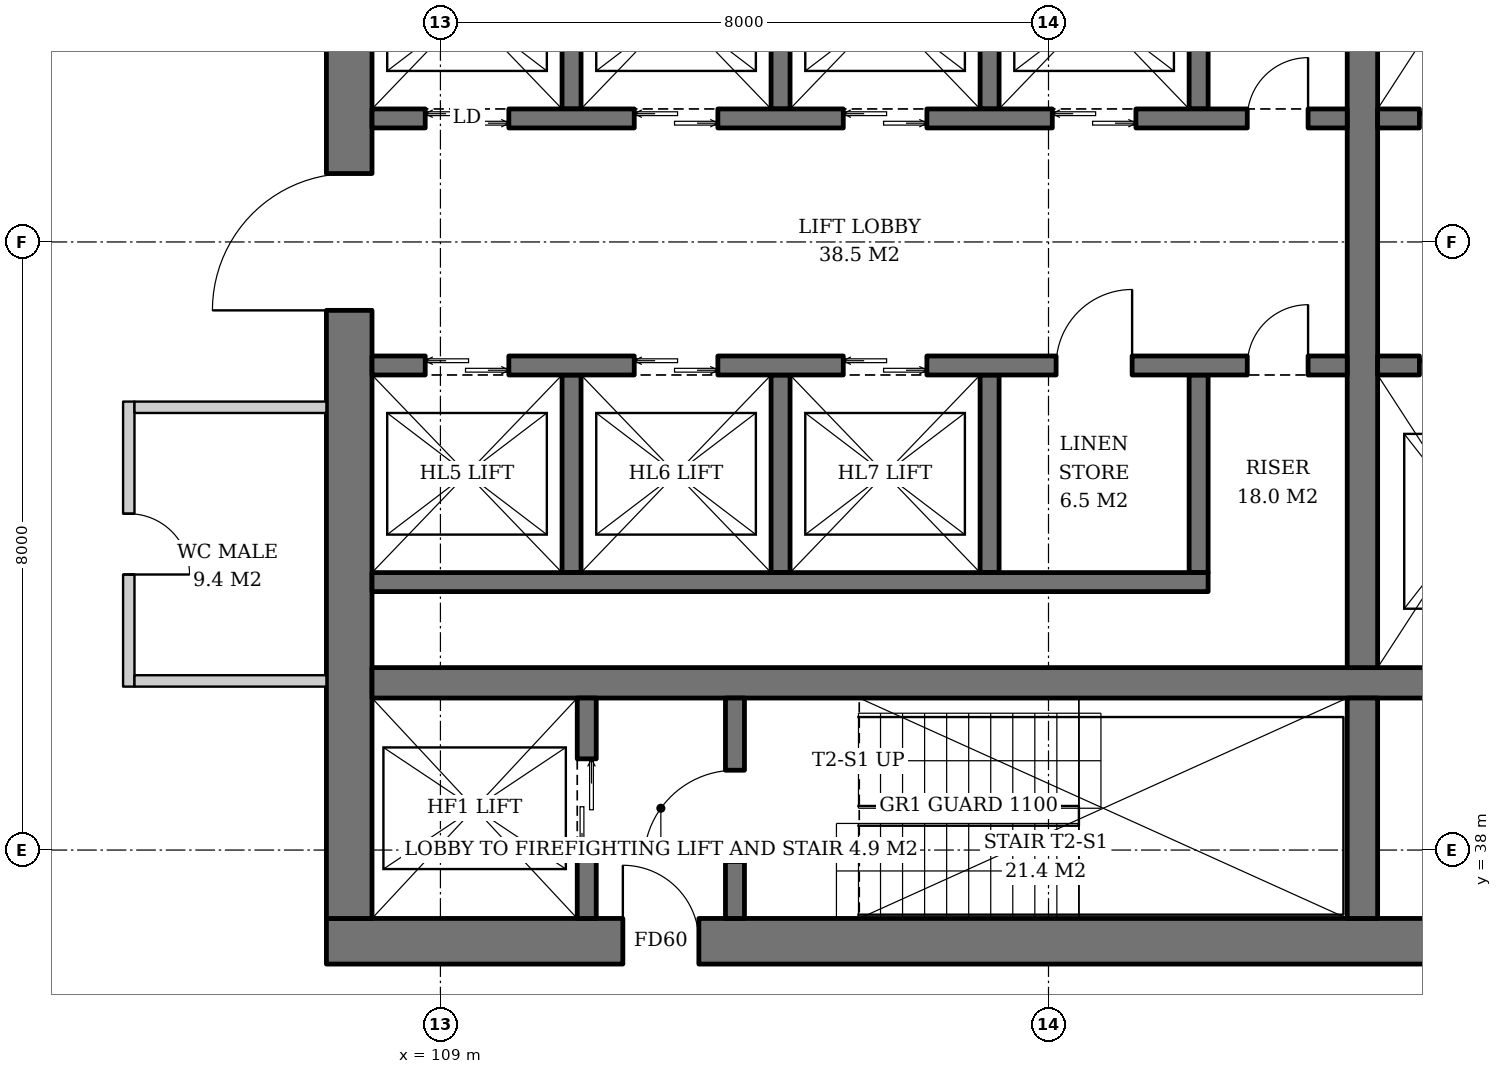
"""IFC4 building model, lengths in metres.
Left out: names, types, materials, properties, quantities, classifications, styles, units other than length and angle.
Written with IfcOpenShell. Run it as: python <this file> out.ifc"""

import sys

from ifc_helpers import new_model, si_unit, direction, frame, frame_2d, origin, place, context, subcontext, project, spatial, rectangle, extrude, element, fill, save


model = new_model("IFC4")
c1 = context("Model", 3, precision=1e-05, world=origin(), true_north=direction((0.0, 1.0)))
c2 = subcontext(c1, "Body", "Model", "MODEL_VIEW")
j1 = project(units=[si_unit("LENGTHUNIT", "METRE"), si_unit("PLANEANGLEUNIT", "RADIAN")], contexts=[c1])
p1 = place(None, origin())
s1 = spatial("IfcSite", under=j1, at=p1, CompositionType="ELEMENT")
p2 = place(p1, origin())
s2 = spatial("IfcBuilding", under=s1, at=p2, CompositionType="ELEMENT")
p3 = place(p2, frame((0.0, 0.0, 21.0)))
s3 = spatial("IfcBuildingStorey", under=s2, at=p3, CompositionType="ELEMENT", Elevation=21.0)
p4 = place(p3, frame((107.5, 36.8, 0.0), z_axis=(0.0, 0.0, 1.0), x_axis=(1.0, 0.0, 0.0)))
e1 = element("IfcWall", 1, at=p4, inside=s3, PredefinedType="SHEAR", context=c2, shape_type="SweptSolid", body=[
    extrude(rectangle(XDim=19.0, YDim=0.6, at=frame_2d((9.5, 0.0))), origin(), (0.0, 0.0, 1.0), 3.8),
])
p5 = place(p4, frame((3.9, 0.0, 0.0)))
e2 = element("IfcOpeningElement", 2, at=p5, cuts=e1, PredefinedType="OPENING", context=c2, shape_type="SweptSolid", body=[
    extrude(rectangle(XDim=1.0, YDim=2.1, at=frame_2d((0.5, 1.05))), frame((0.0, 0.31, 0.0), z_axis=(0.0, -1.0, 0.0), x_axis=(1.0, 0.0, 0.0)), (0.0, 0.0, 1.0), 0.62),
])
p6 = place(p4, frame((15.615, 0.0, 0.0)))
e3 = element("IfcOpeningElement", 3, at=p6, cuts=e1, PredefinedType="OPENING", context=c2, shape_type="SweptSolid", body=[
    extrude(rectangle(XDim=1.0, YDim=2.1, at=frame_2d((0.5, 1.05))), frame((0.0, 0.31, 0.0), z_axis=(0.0, -1.0, 0.0), x_axis=(1.0, 0.0, 0.0)), (0.0, 0.0, 1.0), 0.62),
])
p7 = place(p3, frame((107.8, 37.1, 0.0), z_axis=(0.0, 0.0, 1.0), x_axis=(0.0, 1.0, 0.0)))
e4 = element("IfcWall", 4, at=p7, inside=s3, PredefinedType="SHEAR", context=c2, shape_type="SweptSolid", body=[
    extrude(rectangle(XDim=17.8, YDim=0.6, at=frame_2d((8.9, 0.0))), origin(), (0.0, 0.0, 1.0), 3.8),
])
p8 = place(p7, frame((8.0, 0.0, 0.0)))
e5 = element("IfcOpeningElement", 5, at=p8, cuts=e4, PredefinedType="OPENING", context=c2, shape_type="SweptSolid", body=[
    extrude(rectangle(XDim=1.8, YDim=2.4, at=frame_2d((0.9, 1.2))), frame((0.0, 0.31, 0.0), z_axis=(0.0, -1.0, 0.0), x_axis=(1.0, 0.0, 0.0)), (0.0, 0.0, 1.0), 0.62),
])
p9 = place(p3, frame((108.1, 40.2, 0.0), z_axis=(0.0, 0.0, 1.0), x_axis=(1.0, 0.0, 0.0)))
e6 = element("IfcWall", 6, at=p9, inside=s3, PredefinedType="SHEAR", context=c2, shape_type="SweptSolid", body=[
    extrude(rectangle(XDim=17.8, YDim=0.4, at=frame_2d((8.9, 0.0))), origin(), (0.0, 0.0, 1.0), 3.8),
])
p10 = place(p3, frame((121.13, 37.1, 0.0), z_axis=(0.0, 0.0, 1.0), x_axis=(0.0, 1.0, 0.0)))
e7 = element("IfcWall", 7, at=p10, inside=s3, PredefinedType="SHEAR", context=c2, shape_type="SweptSolid", body=[
    extrude(rectangle(XDim=2.9, YDim=0.4, at=frame_2d((1.45, 0.0))), origin(), (0.0, 0.0, 1.0), 3.8),
])
p11 = place(p3, frame((121.13, 40.4, 0.0), z_axis=(0.0, 0.0, 1.0), x_axis=(0.0, 1.0, 0.0)))
e8 = element("IfcWall", 8, at=p11, inside=s3, PredefinedType="SHEAR", context=c2, shape_type="SweptSolid", body=[
    extrude(rectangle(XDim=11.2, YDim=0.4, at=frame_2d((5.6, 0.0))), origin(), (0.0, 0.0, 1.0), 3.8),
])
p12 = place(p3, frame((110.925, 37.1, 0.0), z_axis=(0.0, 0.0, 1.0), x_axis=(0.0, 1.0, 0.0)))
e9 = element("IfcWall", 9, at=p12, inside=s3, PredefinedType="SHEAR", context=c2, shape_type="SweptSolid", body=[
    extrude(rectangle(XDim=2.9, YDim=0.25, at=frame_2d((1.45, 0.0))), origin(), (0.0, 0.0, 1.0), 3.8),
])
p13 = place(p12, frame((0.8, 0.0, 0.0)))
e10 = element("IfcOpeningElement", 10, at=p13, cuts=e9, PredefinedType="OPENING", context=c2, shape_type="SweptSolid", body=[
    extrude(rectangle(XDim=1.3, YDim=2.2, at=frame_2d((0.65, 1.1))), frame((0.0, 0.135, 0.0), z_axis=(0.0, -1.0, 0.0), x_axis=(1.0, 0.0, 0.0)), (0.0, 0.0, 1.0), 0.27),
])
p14 = place(p3, frame((112.875, 37.1, 0.0), z_axis=(0.0, 0.0, 1.0), x_axis=(0.0, 1.0, 0.0)))
e11 = element("IfcWall", 11, at=p14, inside=s3, PredefinedType="SHEAR", context=c2, shape_type="SweptSolid", body=[
    extrude(rectangle(XDim=2.9, YDim=0.25, at=frame_2d((1.45, 0.0))), origin(), (0.0, 0.0, 1.0), 3.8),
])
p15 = place(p14, frame((0.75, 0.0, 0.0)))
e12 = element("IfcOpeningElement", 12, at=p15, cuts=e11, PredefinedType="OPENING", context=c2, shape_type="SweptSolid", body=[
    extrude(rectangle(XDim=1.2, YDim=2.1, at=frame_2d((0.6, 1.05))), frame((0.0, 0.135, 0.0), z_axis=(0.0, -1.0, 0.0), x_axis=(1.0, 0.0, 0.0)), (0.0, 0.0, 1.0), 0.27),
])
for number, where, z_axis, x_axis in (
    (13, (110.725, 47.75, 0.0), (0.0, 0.0, 1.0), (0.0, 1.0, 0.0)),
    (14, (113.475, 47.75, 0.0), (0.0, 0.0, 1.0), (0.0, 1.0, 0.0)),
    (15, (116.225, 47.75, 0.0), (0.0, 0.0, 1.0), (0.0, 1.0, 0.0)),
    (16, (118.975, 47.75, 0.0), (0.0, 0.0, 1.0), (0.0, 1.0, 0.0)),
):
    element("IfcWall", number, at=place(p3, frame(where, z_axis=z_axis, x_axis=x_axis)), inside=s3, PredefinedType="SHEAR", context=c2, shape_type="SweptSolid", body=[
        extrude(rectangle(XDim=2.6, YDim=0.25, at=frame_2d((1.3, 0.0))), origin(), (0.0, 0.0, 1.0), 3.8),
    ])
p16 = place(p3, frame((108.1, 47.625, 0.0), z_axis=(0.0, 0.0, 1.0), x_axis=(1.0, 0.0, 0.0)))
e17 = element("IfcWall", 17, at=p16, inside=s3, PredefinedType="SHEAR", context=c2, shape_type="SweptSolid", body=[
    extrude(rectangle(XDim=12.83, YDim=0.25, at=frame_2d((6.415, 0.0))), origin(), (0.0, 0.0, 1.0), 3.8),
])
p17 = place(p16, frame((0.7, 0.0, 0.0)))
e18 = element("IfcOpeningElement", 18, at=p17, cuts=e17, PredefinedType="OPENING", context=c2, shape_type="SweptSolid", body=[
    extrude(rectangle(XDim=1.1, YDim=2.2, at=frame_2d((0.55, 1.1))), frame((0.0, 0.135, 0.0), z_axis=(0.0, -1.0, 0.0), x_axis=(1.0, 0.0, 0.0)), (0.0, 0.0, 1.0), 0.27),
])
p18 = place(p16, frame((3.45, 0.0, 0.0)))
e19 = element("IfcOpeningElement", 19, at=p18, cuts=e17, PredefinedType="OPENING", context=c2, shape_type="SweptSolid", body=[
    extrude(rectangle(XDim=1.1, YDim=2.2, at=frame_2d((0.55, 1.1))), frame((0.0, 0.135, 0.0), z_axis=(0.0, -1.0, 0.0), x_axis=(1.0, 0.0, 0.0)), (0.0, 0.0, 1.0), 0.27),
])
p19 = place(p16, frame((6.2, 0.0, 0.0)))
e20 = element("IfcOpeningElement", 20, at=p19, cuts=e17, PredefinedType="OPENING", context=c2, shape_type="SweptSolid", body=[
    extrude(rectangle(XDim=1.1, YDim=2.2, at=frame_2d((0.55, 1.1))), frame((0.0, 0.135, 0.0), z_axis=(0.0, -1.0, 0.0), x_axis=(1.0, 0.0, 0.0)), (0.0, 0.0, 1.0), 0.27),
])
p20 = place(p16, frame((8.95, 0.0, 0.0)))
e21 = element("IfcOpeningElement", 21, at=p20, cuts=e17, PredefinedType="OPENING", context=c2, shape_type="SweptSolid", body=[
    extrude(rectangle(XDim=1.1, YDim=2.2, at=frame_2d((0.55, 1.1))), frame((0.0, 0.135, 0.0), z_axis=(0.0, -1.0, 0.0), x_axis=(1.0, 0.0, 0.0)), (0.0, 0.0, 1.0), 0.27),
])
p21 = place(p16, frame((11.515, 0.0, 0.0)))
e22 = element("IfcOpeningElement", 22, at=p21, cuts=e17, PredefinedType="OPENING", context=c2, shape_type="SweptSolid", body=[
    extrude(rectangle(XDim=0.8, YDim=2.0, at=frame_2d((0.4, 1.0))), frame((0.0, 0.135, 0.0), z_axis=(0.0, -1.0, 0.0), x_axis=(1.0, 0.0, 0.0)), (0.0, 0.0, 1.0), 0.27),
])
for number, where, z_axis, x_axis in (
    (23, (110.725, 44.25, 0.0), (0.0, 0.0, 1.0), (0.0, -1.0, 0.0)),
    (24, (113.475, 44.25, 0.0), (0.0, 0.0, 1.0), (0.0, -1.0, 0.0)),
    (25, (116.225, 44.25, 0.0), (0.0, 0.0, 1.0), (0.0, -1.0, 0.0)),
    (26, (118.975, 44.25, 0.0), (0.0, 0.0, 1.0), (0.0, -1.0, 0.0)),
):
    element("IfcWall", number, at=place(p3, frame(where, z_axis=z_axis, x_axis=x_axis)), inside=s3, PredefinedType="SHEAR", context=c2, shape_type="SweptSolid", body=[
        extrude(rectangle(XDim=2.6, YDim=0.25, at=frame_2d((1.3, 0.0))), origin(), (0.0, 0.0, 1.0), 3.8),
    ])
p22 = place(p3, frame((108.1, 41.525, 0.0), z_axis=(0.0, 0.0, 1.0), x_axis=(1.0, 0.0, 0.0)))
e27 = element("IfcWall", 27, at=p22, inside=s3, PredefinedType="SHEAR", context=c2, shape_type="SweptSolid", body=[
    extrude(rectangle(XDim=11.0, YDim=0.25, at=frame_2d((5.5, 0.0))), origin(), (0.0, 0.0, 1.0), 3.8),
])
p23 = place(p3, frame((108.1, 44.375, 0.0), z_axis=(0.0, 0.0, 1.0), x_axis=(1.0, 0.0, 0.0)))
e28 = element("IfcWall", 28, at=p23, inside=s3, PredefinedType="SHEAR", context=c2, shape_type="SweptSolid", body=[
    extrude(rectangle(XDim=12.83, YDim=0.25, at=frame_2d((6.415, 0.0))), origin(), (0.0, 0.0, 1.0), 3.8),
])
p24 = place(p23, frame((0.7, 0.0, 0.0)))
e29 = element("IfcOpeningElement", 29, at=p24, cuts=e28, PredefinedType="OPENING", context=c2, shape_type="SweptSolid", body=[
    extrude(rectangle(XDim=1.1, YDim=2.2, at=frame_2d((0.55, 1.1))), frame((0.0, 0.135, 0.0), z_axis=(0.0, -1.0, 0.0), x_axis=(1.0, 0.0, 0.0)), (0.0, 0.0, 1.0), 0.27),
])
p25 = place(p23, frame((3.45, 0.0, 0.0)))
e30 = element("IfcOpeningElement", 30, at=p25, cuts=e28, PredefinedType="OPENING", context=c2, shape_type="SweptSolid", body=[
    extrude(rectangle(XDim=1.1, YDim=2.2, at=frame_2d((0.55, 1.1))), frame((0.0, 0.135, 0.0), z_axis=(0.0, -1.0, 0.0), x_axis=(1.0, 0.0, 0.0)), (0.0, 0.0, 1.0), 0.27),
])
p26 = place(p23, frame((6.2, 0.0, 0.0)))
e31 = element("IfcOpeningElement", 31, at=p26, cuts=e28, PredefinedType="OPENING", context=c2, shape_type="SweptSolid", body=[
    extrude(rectangle(XDim=1.1, YDim=2.2, at=frame_2d((0.55, 1.1))), frame((0.0, 0.135, 0.0), z_axis=(0.0, -1.0, 0.0), x_axis=(1.0, 0.0, 0.0)), (0.0, 0.0, 1.0), 0.27),
])
p27 = place(p23, frame((9.0, 0.0, 0.0)))
e32 = element("IfcOpeningElement", 32, at=p27, cuts=e28, PredefinedType="OPENING", context=c2, shape_type="SweptSolid", body=[
    extrude(rectangle(XDim=1.0, YDim=2.1, at=frame_2d((0.5, 1.05))), frame((0.0, 0.135, 0.0), z_axis=(0.0, -1.0, 0.0), x_axis=(1.0, 0.0, 0.0)), (0.0, 0.0, 1.0), 0.27),
])
p28 = place(p23, frame((11.515, 0.0, 0.0)))
e33 = element("IfcOpeningElement", 33, at=p28, cuts=e28, PredefinedType="OPENING", context=c2, shape_type="SweptSolid", body=[
    extrude(rectangle(XDim=0.8, YDim=2.0, at=frame_2d((0.4, 1.0))), frame((0.0, 0.135, 0.0), z_axis=(0.0, -1.0, 0.0), x_axis=(1.0, 0.0, 0.0)), (0.0, 0.0, 1.0), 0.27),
])
p29 = place(p3, frame((121.33, 47.625, 0.0), z_axis=(0.0, 0.0, 1.0), x_axis=(1.0, 0.0, 0.0)))
e34 = element("IfcWall", 34, at=p29, inside=s3, PredefinedType="SHEAR", context=c2, shape_type="SweptSolid", body=[
    extrude(rectangle(XDim=4.57, YDim=0.25, at=frame_2d((2.285, 0.0))), origin(), (0.0, 0.0, 1.0), 3.8),
])
p30 = place(p29, frame((0.55, 0.0, 0.0)))
e35 = element("IfcOpeningElement", 35, at=p30, cuts=e34, PredefinedType="OPENING", context=c2, shape_type="SweptSolid", body=[
    extrude(rectangle(XDim=1.4, YDim=2.4, at=frame_2d((0.7, 1.2))), frame((0.0, 0.135, 0.0), z_axis=(0.0, -1.0, 0.0), x_axis=(1.0, 0.0, 0.0)), (0.0, 0.0, 1.0), 0.27),
])
p31 = place(p29, frame((3.26, 0.0, 0.0)))
e36 = element("IfcOpeningElement", 36, at=p31, cuts=e34, PredefinedType="OPENING", context=c2, shape_type="SweptSolid", body=[
    extrude(rectangle(XDim=0.8, YDim=2.0, at=frame_2d((0.4, 1.0))), frame((0.0, 0.135, 0.0), z_axis=(0.0, -1.0, 0.0), x_axis=(1.0, 0.0, 0.0)), (0.0, 0.0, 1.0), 0.27),
])
p32 = place(p3, frame((121.33, 44.375, 0.0), z_axis=(0.0, 0.0, 1.0), x_axis=(1.0, 0.0, 0.0)))
e37 = element("IfcWall", 37, at=p32, inside=s3, PredefinedType="SHEAR", context=c2, shape_type="SweptSolid", body=[
    extrude(rectangle(XDim=4.57, YDim=0.25, at=frame_2d((2.285, 0.0))), origin(), (0.0, 0.0, 1.0), 3.8),
])
p33 = place(p32, frame((0.55, 0.0, 0.0)))
e38 = element("IfcOpeningElement", 38, at=p33, cuts=e37, PredefinedType="OPENING", context=c2, shape_type="SweptSolid", body=[
    extrude(rectangle(XDim=1.4, YDim=2.4, at=frame_2d((0.7, 1.2))), frame((0.0, 0.135, 0.0), z_axis=(0.0, -1.0, 0.0), x_axis=(1.0, 0.0, 0.0)), (0.0, 0.0, 1.0), 0.27),
])
p34 = place(p32, frame((3.26, 0.0, 0.0)))
e39 = element("IfcOpeningElement", 39, at=p34, cuts=e37, PredefinedType="OPENING", context=c2, shape_type="SweptSolid", body=[
    extrude(rectangle(XDim=0.8, YDim=2.0, at=frame_2d((0.4, 1.0))), frame((0.0, 0.135, 0.0), z_axis=(0.0, -1.0, 0.0), x_axis=(1.0, 0.0, 0.0)), (0.0, 0.0, 1.0), 0.27),
])
p35 = place(p3, frame((104.9, 43.9, 0.0), z_axis=(0.0, 0.0, 1.0), x_axis=(0.0, -1.0, 0.0)))
e40 = element("IfcWall", 40, at=p35, inside=s3, PredefinedType="PARTITIONING", context=c2, shape_type="SweptSolid", body=[
    extrude(rectangle(XDim=3.75, YDim=0.15, at=frame_2d((1.875, 0.0))), origin(), (0.0, 0.0, 1.0), 2.847),
])
p36 = place(p35, frame((1.475, 0.0, 0.0)))
e41 = element("IfcOpeningElement", 41, at=p36, cuts=e40, PredefinedType="OPENING", context=c2, shape_type="SweptSolid", body=[
    extrude(rectangle(XDim=0.8, YDim=2.1, at=frame_2d((0.4, 1.05))), frame((0.0, 0.085, 0.0), z_axis=(0.0, -1.0, 0.0), x_axis=(1.0, 0.0, 0.0)), (0.0, 0.0, 1.0), 0.17),
])
for number, where, z_axis, x_axis in (
    (42, (104.975, 43.825, 0.0), (0.0, 0.0, 1.0), (1.0, 0.0, 0.0)),
    (43, (104.975, 40.225, 0.0), (0.0, 0.0, 1.0), (1.0, 0.0, 0.0)),
):
    element("IfcWall", number, at=place(p3, frame(where, z_axis=z_axis, x_axis=x_axis)), inside=s3, PredefinedType="PARTITIONING", context=c2, shape_type="SweptSolid", body=[
        extrude(rectangle(XDim=2.525, YDim=0.15, at=frame_2d((1.262, 0.0))), origin(), (0.0, 0.0, 1.0), 3.6),
    ])
p37 = place(p13, origin())
e44 = element("IfcDoor", 44, at=p37, inside=s3, OperationType="DOUBLE_DOOR_SLIDING", PredefinedType="DOOR", context=c2, shape_type="SweptSolid", body=[
    extrude(rectangle(XDim=1.3, YDim=2.2, at=frame_2d((0.65, 1.1))), frame((0.0, 0.025, 0.0), z_axis=(0.0, -1.0, 0.0), x_axis=(1.0, 0.0, 0.0)), (0.0, 0.0, 1.0), 0.05),
])
fill(e10, e44)
p38 = place(p15, origin())
e45 = element("IfcDoor", 45, at=p38, inside=s3, OperationType="SINGLE_SWING_LEFT", PredefinedType="DOOR", context=c2, shape_type="SweptSolid", body=[
    extrude(rectangle(XDim=1.2, YDim=2.1, at=frame_2d((0.6, 1.05))), frame((0.0, 0.025, 0.0), z_axis=(0.0, -1.0, 0.0), x_axis=(1.0, 0.0, 0.0)), (0.0, 0.0, 1.0), 0.05),
])
fill(e12, e45)
p39 = place(p17, origin())
e46 = element("IfcDoor", 46, at=p39, inside=s3, OperationType="DOUBLE_DOOR_SLIDING", PredefinedType="DOOR", context=c2, shape_type="SweptSolid", body=[
    extrude(rectangle(XDim=1.1, YDim=2.2, at=frame_2d((0.55, 1.1))), frame((0.0, 0.025, 0.0), z_axis=(0.0, -1.0, 0.0), x_axis=(1.0, 0.0, 0.0)), (0.0, 0.0, 1.0), 0.05),
])
fill(e18, e46)
p40 = place(p18, origin())
e47 = element("IfcDoor", 47, at=p40, inside=s3, OperationType="DOUBLE_DOOR_SLIDING", PredefinedType="DOOR", context=c2, shape_type="SweptSolid", body=[
    extrude(rectangle(XDim=1.1, YDim=2.2, at=frame_2d((0.55, 1.1))), frame((0.0, 0.025, 0.0), z_axis=(0.0, -1.0, 0.0), x_axis=(1.0, 0.0, 0.0)), (0.0, 0.0, 1.0), 0.05),
])
fill(e19, e47)
p41 = place(p19, origin())
e48 = element("IfcDoor", 48, at=p41, inside=s3, OperationType="DOUBLE_DOOR_SLIDING", PredefinedType="DOOR", context=c2, shape_type="SweptSolid", body=[
    extrude(rectangle(XDim=1.1, YDim=2.2, at=frame_2d((0.55, 1.1))), frame((0.0, 0.025, 0.0), z_axis=(0.0, -1.0, 0.0), x_axis=(1.0, 0.0, 0.0)), (0.0, 0.0, 1.0), 0.05),
])
fill(e20, e48)
p42 = place(p20, origin())
e49 = element("IfcDoor", 49, at=p42, inside=s3, OperationType="DOUBLE_DOOR_SLIDING", PredefinedType="DOOR", context=c2, shape_type="SweptSolid", body=[
    extrude(rectangle(XDim=1.1, YDim=2.2, at=frame_2d((0.55, 1.1))), frame((0.0, 0.025, 0.0), z_axis=(0.0, -1.0, 0.0), x_axis=(1.0, 0.0, 0.0)), (0.0, 0.0, 1.0), 0.05),
])
fill(e21, e49)
p43 = place(p21, origin())
e50 = element("IfcDoor", 50, at=p43, inside=s3, OperationType="SINGLE_SWING_RIGHT", PredefinedType="DOOR", context=c2, shape_type="SweptSolid", body=[
    extrude(rectangle(XDim=0.8, YDim=2.0, at=frame_2d((0.4, 1.0))), frame((0.0, 0.025, 0.0), z_axis=(0.0, -1.0, 0.0), x_axis=(1.0, 0.0, 0.0)), (0.0, 0.0, 1.0), 0.05),
])
fill(e22, e50)
p44 = place(p24, origin())
e51 = element("IfcDoor", 51, at=p44, inside=s3, OperationType="DOUBLE_DOOR_SLIDING", PredefinedType="DOOR", context=c2, shape_type="SweptSolid", body=[
    extrude(rectangle(XDim=1.1, YDim=2.2, at=frame_2d((0.55, 1.1))), frame((0.0, 0.025, 0.0), z_axis=(0.0, -1.0, 0.0), x_axis=(1.0, 0.0, 0.0)), (0.0, 0.0, 1.0), 0.05),
])
fill(e29, e51)
p45 = place(p25, origin())
e52 = element("IfcDoor", 52, at=p45, inside=s3, OperationType="DOUBLE_DOOR_SLIDING", PredefinedType="DOOR", context=c2, shape_type="SweptSolid", body=[
    extrude(rectangle(XDim=1.1, YDim=2.2, at=frame_2d((0.55, 1.1))), frame((0.0, 0.025, 0.0), z_axis=(0.0, -1.0, 0.0), x_axis=(1.0, 0.0, 0.0)), (0.0, 0.0, 1.0), 0.05),
])
fill(e30, e52)
p46 = place(p26, origin())
e53 = element("IfcDoor", 53, at=p46, inside=s3, OperationType="DOUBLE_DOOR_SLIDING", PredefinedType="DOOR", context=c2, shape_type="SweptSolid", body=[
    extrude(rectangle(XDim=1.1, YDim=2.2, at=frame_2d((0.55, 1.1))), frame((0.0, 0.025, 0.0), z_axis=(0.0, -1.0, 0.0), x_axis=(1.0, 0.0, 0.0)), (0.0, 0.0, 1.0), 0.05),
])
fill(e31, e53)
p47 = place(p27, origin())
e54 = element("IfcDoor", 54, at=p47, inside=s3, OperationType="SINGLE_SWING_RIGHT", PredefinedType="DOOR", context=c2, shape_type="SweptSolid", body=[
    extrude(rectangle(XDim=1.0, YDim=2.1, at=frame_2d((0.5, 1.05))), frame((0.0, 0.025, 0.0), z_axis=(0.0, -1.0, 0.0), x_axis=(1.0, 0.0, 0.0)), (0.0, 0.0, 1.0), 0.05),
])
fill(e32, e54)
p48 = place(p28, origin())
e55 = element("IfcDoor", 55, at=p48, inside=s3, OperationType="SINGLE_SWING_RIGHT", PredefinedType="DOOR", context=c2, shape_type="SweptSolid", body=[
    extrude(rectangle(XDim=0.8, YDim=2.0, at=frame_2d((0.4, 1.0))), frame((0.0, 0.025, 0.0), z_axis=(0.0, -1.0, 0.0), x_axis=(1.0, 0.0, 0.0)), (0.0, 0.0, 1.0), 0.05),
])
fill(e33, e55)
p49 = place(p30, origin())
e56 = element("IfcDoor", 56, at=p49, inside=s3, OperationType="DOUBLE_DOOR_SLIDING", PredefinedType="DOOR", context=c2, shape_type="SweptSolid", body=[
    extrude(rectangle(XDim=1.4, YDim=2.4, at=frame_2d((0.7, 1.2))), frame((0.0, 0.025, 0.0), z_axis=(0.0, -1.0, 0.0), x_axis=(1.0, 0.0, 0.0)), (0.0, 0.0, 1.0), 0.05),
])
fill(e35, e56)
p50 = place(p33, origin())
e57 = element("IfcDoor", 57, at=p50, inside=s3, OperationType="DOUBLE_DOOR_SLIDING", PredefinedType="DOOR", context=c2, shape_type="SweptSolid", body=[
    extrude(rectangle(XDim=1.4, YDim=2.4, at=frame_2d((0.7, 1.2))), frame((0.0, 0.025, 0.0), z_axis=(0.0, -1.0, 0.0), x_axis=(1.0, 0.0, 0.0)), (0.0, 0.0, 1.0), 0.05),
])
fill(e38, e57)
p51 = place(p5, origin())
e58 = element("IfcDoor", 58, at=p51, inside=s3, OperationType="SINGLE_SWING_LEFT", PredefinedType="DOOR", context=c2, shape_type="SweptSolid", body=[
    extrude(rectangle(XDim=1.0, YDim=2.1, at=frame_2d((0.5, 1.05))), frame((0.0, 0.025, 0.0), z_axis=(0.0, -1.0, 0.0), x_axis=(1.0, 0.0, 0.0)), (0.0, 0.0, 1.0), 0.05),
])
fill(e2, e58)
p52 = place(p8, origin())
e59 = element("IfcDoor", 59, at=p52, inside=s3, OperationType="DOUBLE_DOOR_SINGLE_SWING", PredefinedType="DOOR", context=c2, shape_type="SweptSolid", body=[
    extrude(rectangle(XDim=1.8, YDim=2.4, at=frame_2d((0.9, 1.2))), frame((0.0, 0.025, 0.0), z_axis=(0.0, -1.0, 0.0), x_axis=(1.0, 0.0, 0.0)), (0.0, 0.0, 1.0), 0.05),
])
fill(e5, e59)
p53 = place(p36, origin())
e60 = element("IfcDoor", 60, at=p53, inside=s3, OperationType="SINGLE_SWING_RIGHT", PredefinedType="DOOR", context=c2, shape_type="SweptSolid", body=[
    extrude(rectangle(XDim=0.8, YDim=2.1, at=frame_2d((0.4, 1.05))), frame((0.0, 0.025, 0.0), z_axis=(0.0, -1.0, 0.0), x_axis=(1.0, 0.0, 0.0)), (0.0, 0.0, 1.0), 0.05),
])
fill(e41, e60)
save(model, sys.argv[1])
